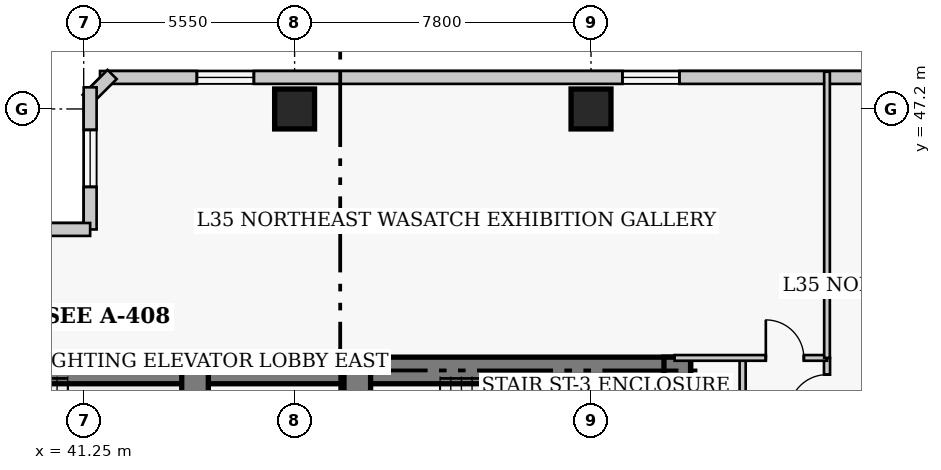
"""IFC4 building model, lengths in metres.
Left out: names, types, materials, properties, quantities, classifications, styles, units other than length and angle.
Written with IfcOpenShell. Run it as: python <this file> out.ifc"""

import sys

from ifc_helpers import new_model, si_unit, direction, frame, frame_2d, origin, origin_2d, place, context, subcontext, project, spatial, rectangle, extrude, element, fill, save


model = new_model("IFC4")
c1 = context("Model", 3, precision=1e-05, world=origin(), true_north=direction((0.0, 1.0)))
c2 = subcontext(c1, "Body", "Model", "MODEL_VIEW")
j1 = project(units=[si_unit("LENGTHUNIT", "METRE"), si_unit("PLANEANGLEUNIT", "RADIAN")], contexts=[c1])
p1 = place(None, origin())
s1 = spatial("IfcSite", under=j1, at=p1, CompositionType="ELEMENT")
p2 = place(p1, origin())
s2 = spatial("IfcBuilding", under=s1, at=p2, CompositionType="ELEMENT")
p3 = place(p2, frame((0.0, 0.0, 142.2)))
s3 = spatial("IfcBuildingStorey", under=s2, at=p3, CompositionType="ELEMENT", Elevation=142.2)
p4 = place(p3, frame((35.85, 40.32, 0.0), z_axis=(0.0, 0.0, 1.0), x_axis=(1.0, 0.0, 0.0)))
e1 = element("IfcWall", 1, at=p4, inside=s3, PredefinedType="SHEAR", context=c2, shape_type="SweptSolid", body=[
    extrude(rectangle(XDim=12.6, YDim=0.7, at=frame_2d((6.3, 0.0))), origin(), (0.0, 0.0, 1.0), 3.8),
])
p5 = place(p3, frame((48.45, 40.32, 0.0), z_axis=(0.0, 0.0, 1.0), x_axis=(1.0, 0.0, 0.0)))
e2 = element("IfcWall", 2, at=p5, inside=s3, PredefinedType="SHEAR", context=c2, shape_type="SweptSolid", body=[
    extrude(rectangle(XDim=8.77, YDim=0.7, at=frame_2d((4.385, 0.0))), origin(), (0.0, 0.0, 1.0), 3.8),
])
p6 = place(p3, frame((56.87, 27.05, 0.0), z_axis=(0.0, 0.0, 1.0), x_axis=(0.0, 1.0, 0.0)))
e3 = element("IfcWall", 3, at=p6, inside=s3, PredefinedType="SHEAR", context=c2, shape_type="SweptSolid", body=[
    extrude(rectangle(XDim=13.62, YDim=0.7, at=frame_2d((6.81, 0.0))), origin(), (0.0, 0.0, 1.0), 3.8),
])
p7 = place(p3, frame((44.18, 36.37, 0.0), z_axis=(0.0, 0.0, 1.0), x_axis=(0.0, 1.0, 0.0)))
e4 = element("IfcWall", 4, at=p7, inside=s3, PredefinedType="SHEAR", context=c2, shape_type="SweptSolid", body=[
    extrude(rectangle(XDim=3.95, YDim=0.7, at=frame_2d((1.975, 0.0))), origin(), (0.0, 0.0, 1.0), 3.8),
])
p8 = place(p3, frame((48.45, 32.4, 0.0), z_axis=(0.0, 0.0, 1.0), x_axis=(0.0, 1.0, 0.0)))
e5 = element("IfcWall", 5, at=p8, inside=s3, PredefinedType="SHEAR", context=c2, shape_type="SweptSolid", body=[
    extrude(rectangle(XDim=7.92, YDim=0.7, at=frame_2d((3.96, 0.0))), origin(), (0.0, 0.0, 1.0), 3.8),
])
p9 = place(p8, frame((5.8, 0.0, 0.0)))
e6 = element("IfcOpeningElement", 6, at=p9, cuts=e5, PredefinedType="OPENING", context=c2, shape_type="SweptSolid", body=[
    extrude(rectangle(XDim=1.1, YDim=2.15, at=frame_2d((0.55, 1.075))), frame((0.0, 0.36, 0.0), z_axis=(0.0, -1.0, 0.0), x_axis=(1.0, 0.0, 0.0)), (0.0, 0.0, 1.0), 0.72),
])
for number, where, z_axis, x_axis in (
    (7, (46.8, 47.2, 0.0), (0.0, 0.0, 1.0), (1.0, 0.0, 0.0)),
    (8, (54.6, 47.2, 0.0), (0.0, 0.0, 1.0), (1.0, 0.0, 0.0)),
):
    element("IfcColumn", number, at=place(p3, frame(where, z_axis=z_axis, x_axis=x_axis)), inside=s3, PredefinedType="COLUMN", context=c2, shape_type="SweptSolid", body=[
        extrude(rectangle(XDim=1.05, YDim=1.05, at=origin_2d()), origin(), (0.0, 0.0, 1.0), 3.8),
    ])
p10 = place(p3, frame((68.37, 48.03, 0.0), z_axis=(0.0, 0.0, 1.0), x_axis=(-1.0, 0.0, 0.0)))
e9 = element("IfcWall", 9, at=p10, inside=s3, PredefinedType="SOLIDWALL", context=c2, shape_type="SweptSolid", body=[
    extrude(rectangle(XDim=26.69, YDim=0.34, at=frame_2d((13.345, 0.0))), origin(), (0.0, 0.0, 1.0), 3.55),
])
p11 = place(p10, frame((3.048, 0.0, 0.85)))
e10 = element("IfcOpeningElement", 10, at=p11, cuts=e9, PredefinedType="OPENING", context=c2, shape_type="SweptSolid", body=[
    extrude(rectangle(XDim=1.5, YDim=1.75, at=frame_2d((0.75, 0.875))), frame((0.0, 0.18, 0.0), z_axis=(0.0, -1.0, 0.0), x_axis=(1.0, 0.0, 0.0)), (0.0, 0.0, 1.0), 0.36),
])
p12 = place(p10, frame((11.445, 0.0, 0.85)))
e11 = element("IfcOpeningElement", 11, at=p12, cuts=e9, PredefinedType="OPENING", context=c2, shape_type="SweptSolid", body=[
    extrude(rectangle(XDim=1.5, YDim=1.75, at=frame_2d((0.75, 0.875))), frame((0.0, 0.18, 0.0), z_axis=(0.0, -1.0, 0.0), x_axis=(1.0, 0.0, 0.0)), (0.0, 0.0, 1.0), 0.36),
])
p13 = place(p10, frame((22.642, 0.0, 0.85)))
e12 = element("IfcOpeningElement", 12, at=p13, cuts=e9, PredefinedType="OPENING", context=c2, shape_type="SweptSolid", body=[
    extrude(rectangle(XDim=1.5, YDim=1.75, at=frame_2d((0.75, 0.875))), frame((0.0, 0.18, 0.0), z_axis=(0.0, -1.0, 0.0), x_axis=(1.0, 0.0, 0.0)), (0.0, 0.0, 1.0), 0.36),
])
p14 = place(p3, frame((41.999, 48.108, 0.0), z_axis=(0.0, 0.0, 1.0), x_axis=(-0.707106781187, -0.707106781187, 0.0)))
e13 = element("IfcWall", 13, at=p14, inside=s3, PredefinedType="SOLIDWALL", context=c2, shape_type="SweptSolid", body=[
    extrude(rectangle(XDim=0.929, YDim=0.34, at=frame_2d((0.464, 0.0))), origin(), (0.0, 0.0, 1.0), 3.55),
])
p15 = place(p3, frame((41.42, 47.77, 0.0), z_axis=(0.0, 0.0, 1.0), x_axis=(0.0, -1.0, 0.0)))
e14 = element("IfcWall", 14, at=p15, inside=s3, PredefinedType="SOLIDWALL", context=c2, shape_type="SweptSolid", body=[
    extrude(rectangle(XDim=3.74, YDim=0.34, at=frame_2d((1.87, 0.0))), origin(), (0.0, 0.0, 1.0), 3.55),
])
p16 = place(p15, frame((1.12, 0.0, 0.85)))
e15 = element("IfcOpeningElement", 15, at=p16, cuts=e14, PredefinedType="OPENING", context=c2, shape_type="SweptSolid", body=[
    extrude(rectangle(XDim=1.5, YDim=1.75, at=frame_2d((0.75, 0.875))), frame((0.0, 0.18, 0.0), z_axis=(0.0, -1.0, 0.0), x_axis=(1.0, 0.0, 0.0)), (0.0, 0.0, 1.0), 0.36),
])
p17 = place(p3, frame((41.42, 44.03, 0.0), z_axis=(0.0, 0.0, 1.0), x_axis=(-1.0, 0.0, 0.0)))
e16 = element("IfcWall", 16, at=p17, inside=s3, PredefinedType="SOLIDWALL", context=c2, shape_type="SweptSolid", body=[
    extrude(rectangle(XDim=4.84, YDim=0.34, at=frame_2d((2.42, 0.0))), origin(), (0.0, 0.0, 1.0), 3.55),
])
p18 = place(p17, frame((1.67, 0.0, 0.85)))
e17 = element("IfcOpeningElement", 17, at=p18, cuts=e16, PredefinedType="OPENING", context=c2, shape_type="SweptSolid", body=[
    extrude(rectangle(XDim=1.5, YDim=1.75, at=frame_2d((0.75, 0.875))), frame((0.0, 0.18, 0.0), z_axis=(0.0, -1.0, 0.0), x_axis=(1.0, 0.0, 0.0)), (0.0, 0.0, 1.0), 0.36),
])
p19 = place(p3, frame((60.81, 12.05, 0.0), z_axis=(0.0, 0.0, 1.0), x_axis=(0.0, 1.0, 0.0)))
e18 = element("IfcWall", 18, at=p19, inside=s3, PredefinedType="PARTITIONING", context=c2, shape_type="SweptSolid", body=[
    extrude(rectangle(XDim=28.6, YDim=0.16, at=frame_2d((14.3, 0.0))), origin(), (0.0, 0.0, 1.0), 3.55),
])
p20 = place(p19, frame((0.925, 0.0, 0.0)))
e19 = element("IfcOpeningElement", 19, at=p20, cuts=e18, PredefinedType="OPENING", context=c2, shape_type="SweptSolid", body=[
    extrude(rectangle(XDim=0.95, YDim=2.1, at=frame_2d((0.475, 1.05))), frame((0.0, 0.09, 0.0), z_axis=(0.0, -1.0, 0.0), x_axis=(1.0, 0.0, 0.0)), (0.0, 0.0, 1.0), 0.18),
])
p21 = place(p19, frame((20.0, 0.0, 0.0)))
e20 = element("IfcOpeningElement", 20, at=p21, cuts=e18, PredefinedType="OPENING", context=c2, shape_type="SweptSolid", body=[
    extrude(rectangle(XDim=0.95, YDim=2.1, at=frame_2d((0.475, 1.05))), frame((0.0, 0.09, 0.0), z_axis=(0.0, -1.0, 0.0), x_axis=(1.0, 0.0, 0.0)), (0.0, 0.0, 1.0), 0.18),
])
p22 = place(p19, frame((27.16, 0.0, 0.0)))
e21 = element("IfcOpeningElement", 21, at=p22, cuts=e18, PredefinedType="OPENING", context=c2, shape_type="SweptSolid", body=[
    extrude(rectangle(XDim=1.0, YDim=2.15, at=frame_2d((0.5, 1.075))), frame((0.0, 0.09, 0.0), z_axis=(0.0, -1.0, 0.0), x_axis=(1.0, 0.0, 0.0)), (0.0, 0.0, 1.0), 0.18),
])
p23 = place(p3, frame((58.59, 16.66, 0.0), z_axis=(0.0, 0.0, 1.0), x_axis=(0.0, 1.0, 0.0)))
e22 = element("IfcWall", 22, at=p23, inside=s3, PredefinedType="PARTITIONING", context=c2, shape_type="SweptSolid", body=[
    extrude(rectangle(XDim=23.99, YDim=0.16, at=frame_2d((11.995, 0.0))), origin(), (0.0, 0.0, 1.0), 3.093),
])
p24 = place(p3, frame((56.8, 40.65, 0.0), z_axis=(0.0, 0.0, 1.0), x_axis=(1.0, 0.0, 0.0)))
e23 = element("IfcWall", 23, at=p24, inside=s3, PredefinedType="PARTITIONING", context=c2, shape_type="SweptSolid", body=[
    extrude(rectangle(XDim=4.01, YDim=0.15, at=frame_2d((2.005, 0.0))), origin(), (0.0, 0.0, 1.0), 3.55),
])
p25 = place(p24, frame((2.4, 0.0, 0.0)))
e24 = element("IfcOpeningElement", 24, at=p25, cuts=e23, PredefinedType="OPENING", context=c2, shape_type="SweptSolid", body=[
    extrude(rectangle(XDim=1.0, YDim=2.15, at=frame_2d((0.5, 1.075))), frame((0.0, 0.085, 0.0), z_axis=(0.0, -1.0, 0.0), x_axis=(1.0, 0.0, 0.0)), (0.0, 0.0, 1.0), 0.17),
])
p26 = place(p3, frame((60.81, 40.65, 0.0), z_axis=(0.0, 0.0, 1.0), x_axis=(0.0, 1.0, 0.0)))
e25 = element("IfcWall", 25, at=p26, inside=s3, PredefinedType="PARTITIONING", context=c2, shape_type="SweptSolid", body=[
    extrude(rectangle(XDim=7.53, YDim=0.15, at=frame_2d((3.765, 0.0))), origin(), (0.0, 0.0, 1.0), 3.55),
])
p27 = place(p12, origin())
e26 = element("IfcWindow", 26, at=p27, inside=s3, PartitioningType="SINGLE_PANEL", PredefinedType="WINDOW", context=c2, shape_type="SweptSolid", body=[
    extrude(rectangle(XDim=1.5, YDim=1.75, at=frame_2d((0.75, 0.875))), frame((0.0, 0.03, 0.0), z_axis=(0.0, -1.0, 0.0), x_axis=(1.0, 0.0, 0.0)), (0.0, 0.0, 1.0), 0.06),
])
fill(e11, e26)
p28 = place(p13, origin())
e27 = element("IfcWindow", 27, at=p28, inside=s3, PartitioningType="SINGLE_PANEL", PredefinedType="WINDOW", context=c2, shape_type="SweptSolid", body=[
    extrude(rectangle(XDim=1.5, YDim=1.75, at=frame_2d((0.75, 0.875))), frame((0.0, 0.03, 0.0), z_axis=(0.0, -1.0, 0.0), x_axis=(1.0, 0.0, 0.0)), (0.0, 0.0, 1.0), 0.06),
])
fill(e12, e27)
p29 = place(p16, origin())
e28 = element("IfcWindow", 28, at=p29, inside=s3, PartitioningType="SINGLE_PANEL", PredefinedType="WINDOW", context=c2, shape_type="SweptSolid", body=[
    extrude(rectangle(XDim=1.5, YDim=1.75, at=frame_2d((0.75, 0.875))), frame((0.0, 0.03, 0.0), z_axis=(0.0, -1.0, 0.0), x_axis=(1.0, 0.0, 0.0)), (0.0, 0.0, 1.0), 0.06),
])
fill(e15, e28)
p30 = place(p25, origin())
e29 = element("IfcDoor", 29, at=p30, inside=s3, OperationType="SINGLE_SWING_LEFT", PredefinedType="DOOR", context=c2, shape_type="SweptSolid", body=[
    extrude(rectangle(XDim=1.0, YDim=2.15, at=frame_2d((0.5, 1.075))), frame((0.0, 0.025, 0.0), z_axis=(0.0, -1.0, 0.0), x_axis=(1.0, 0.0, 0.0)), (0.0, 0.0, 1.0), 0.05),
])
fill(e24, e29)
p31 = place(p22, origin())
e30 = element("IfcDoor", 30, at=p31, inside=s3, OperationType="SINGLE_SWING_LEFT", PredefinedType="DOOR", context=c2, shape_type="SweptSolid", body=[
    extrude(rectangle(XDim=1.0, YDim=2.15, at=frame_2d((0.5, 1.075))), frame((0.0, 0.025, 0.0), z_axis=(0.0, -1.0, 0.0), x_axis=(1.0, 0.0, 0.0)), (0.0, 0.0, 1.0), 0.05),
])
fill(e21, e30)
save(model, sys.argv[1])
